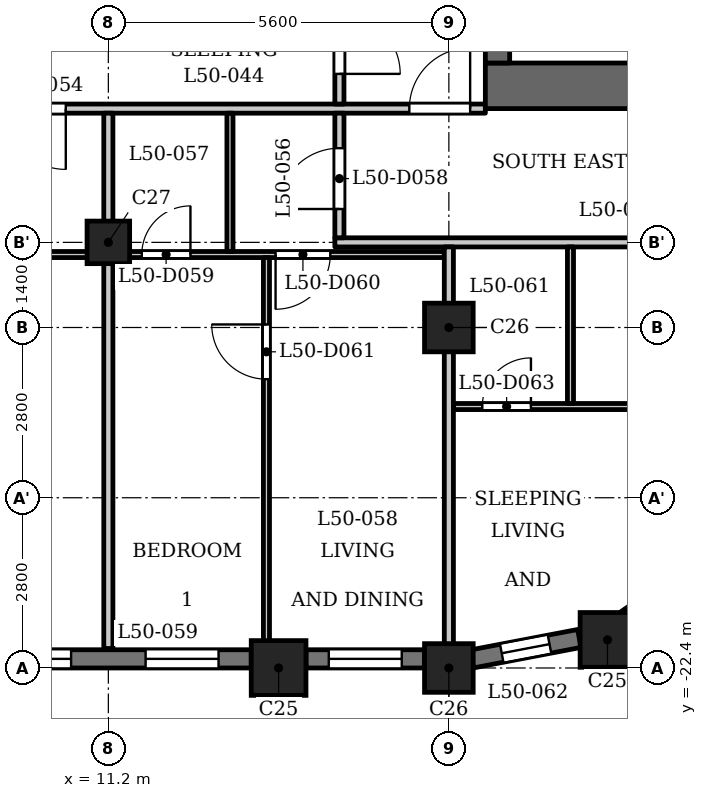
"""IFC4 building model, lengths in metres.
Left out: names, types, materials, properties, quantities, classifications, styles, units other than length and angle.
Written with IfcOpenShell. Run it as: python <this file> out.ifc"""

import sys

from ifc_helpers import new_model, si_unit, direction, frame, frame_2d, origin, origin_2d, place, context, subcontext, project, spatial, rectangle, extrude, element, fill, save


model = new_model("IFC4")
c1 = context("Model", 3, precision=1e-05, world=origin(), true_north=direction((0.0, 1.0)))
c2 = subcontext(c1, "Body", "Model", "MODEL_VIEW")
j1 = project(units=[si_unit("LENGTHUNIT", "METRE"), si_unit("PLANEANGLEUNIT", "RADIAN")], contexts=[c1])
p1 = place(None, origin())
s1 = spatial("IfcSite", under=j1, at=p1, CompositionType="ELEMENT")
p2 = place(p1, origin())
s2 = spatial("IfcBuilding", under=s1, at=p2, CompositionType="ELEMENT")
p3 = place(p2, frame((0.0, 0.0, 195.9)))
s3 = spatial("IfcBuildingStorey", under=s2, at=p3, CompositionType="ELEMENT", Elevation=195.9)
for number, where, z_axis, x_axis in (
    (1, (14.0, -22.4, 0.0), (0.0, 0.0, 1.0), (1.0, 0.0, 0.0)),
    (2, (19.409, -21.938, 0.0), (0.0, 0.0, 1.0), (1.0, 0.0, 0.0)),
):
    element("IfcColumn", number, at=place(p3, frame(where, z_axis=z_axis, x_axis=x_axis)), inside=s3, PredefinedType="COLUMN", context=c2, shape_type="SweptSolid", body=[
        extrude(rectangle(XDim=0.9, YDim=0.9, at=origin_2d()), origin(), (0.0, 0.0, 1.0), 3.5),
    ])
for number, where, z_axis, x_axis in (
    (3, (16.8, -22.4, 0.0), (0.0, 0.0, 1.0), (1.0, 0.0, 0.0)),
    (4, (16.8, -16.8, 0.0), (0.0, 0.0, 1.0), (1.0, 0.0, 0.0)),
):
    element("IfcColumn", number, at=place(p3, frame(where, z_axis=z_axis, x_axis=x_axis)), inside=s3, PredefinedType="COLUMN", context=c2, shape_type="SweptSolid", body=[
        extrude(rectangle(XDim=0.8, YDim=0.8, at=origin_2d()), origin(), (0.0, 0.0, 1.0), 3.5),
    ])
p4 = place(p3, frame((11.2, -15.4, 0.0), z_axis=(0.0, 0.0, 1.0), x_axis=(1.0, 0.0, 0.0)))
e5 = element("IfcColumn", 5, at=p4, inside=s3, PredefinedType="COLUMN", context=c2, shape_type="SweptSolid", body=[
    extrude(rectangle(XDim=0.7, YDim=0.7, at=origin_2d()), origin(), (0.0, 0.0, 1.0), 3.5),
])
p5 = place(p3, frame((8.85, -22.25, 0.0), z_axis=(0.0, 0.0, 1.0), x_axis=(1.0, 0.0, 0.0)))
e6 = element("IfcWall", 6, at=p5, inside=s3, PredefinedType="SOLIDWALL", context=c2, shape_type="SweptSolid", body=[
    extrude(rectangle(XDim=4.7, YDim=0.3, at=frame_2d((2.35, 0.0))), origin(), (0.0, 0.0, 1.0), 2.5),
])
p6 = place(p5, frame((0.538, 0.0, 0.6)))
e7 = element("IfcOpeningElement", 7, at=p6, cuts=e6, PredefinedType="OPENING", context=c2, shape_type="SweptSolid", body=[
    extrude(rectangle(XDim=1.2, YDim=1.55, at=frame_2d((0.6, 0.775))), frame((0.0, 0.16, 0.0), z_axis=(0.0, -1.0, 0.0), x_axis=(1.0, 0.0, 0.0)), (0.0, 0.0, 1.0), 0.32),
])
p7 = place(p5, frame((2.962, 0.0, 0.6)))
e8 = element("IfcOpeningElement", 8, at=p7, cuts=e6, PredefinedType="OPENING", context=c2, shape_type="SweptSolid", body=[
    extrude(rectangle(XDim=1.2, YDim=1.55, at=frame_2d((0.6, 0.775))), frame((0.0, 0.16, 0.0), z_axis=(0.0, -1.0, 0.0), x_axis=(1.0, 0.0, 0.0)), (0.0, 0.0, 1.0), 0.32),
])
p8 = place(p3, frame((14.45, -22.25, 0.0), z_axis=(0.0, 0.0, 1.0), x_axis=(1.0, 0.0, 0.0)))
e9 = element("IfcWall", 9, at=p8, inside=s3, PredefinedType="SOLIDWALL", context=c2, shape_type="SweptSolid", body=[
    extrude(rectangle(XDim=1.95, YDim=0.3, at=frame_2d((0.975, 0.0))), origin(), (0.0, 0.0, 1.0), 2.5),
])
p9 = place(p8, frame((0.375, 0.0, 0.6)))
e10 = element("IfcOpeningElement", 10, at=p9, cuts=e9, PredefinedType="OPENING", context=c2, shape_type="SweptSolid", body=[
    extrude(rectangle(XDim=1.2, YDim=1.55, at=frame_2d((0.6, 0.775))), frame((0.0, 0.16, 0.0), z_axis=(0.0, -1.0, 0.0), x_axis=(1.0, 0.0, 0.0)), (0.0, 0.0, 1.0), 0.32),
])
p10 = place(p3, frame((17.179, -22.251, 0.0), z_axis=(0.0, 0.0, 1.0), x_axis=(0.98230529033, 0.187286722942, 0.0)))
e11 = element("IfcWall", 11, at=p10, inside=s3, PredefinedType="SOLIDWALL", context=c2, shape_type="SweptSolid", body=[
    extrude(rectangle(XDim=1.799, YDim=0.3, at=frame_2d((0.899, 0.0))), origin(), (0.0, 0.0, 1.0), 2.5),
])
p11 = place(p10, frame((0.5, 0.0, 0.6)))
e12 = element("IfcOpeningElement", 12, at=p11, cuts=e11, PredefinedType="OPENING", context=c2, shape_type="SweptSolid", body=[
    extrude(rectangle(XDim=0.8, YDim=1.55, at=frame_2d((0.4, 0.775))), frame((0.0, 0.16, 0.0), z_axis=(0.0, -1.0, 0.0), x_axis=(1.0, 0.0, 0.0)), (0.0, 0.0, 1.0), 0.32),
])
p12 = place(p3, frame((19.719, -21.594, 0.0), z_axis=(0.0, 0.0, 1.0), x_axis=(0.827067282455, 0.562102935673, 0.0)))
e13 = element("IfcWall", 13, at=p12, inside=s3, PredefinedType="SOLIDWALL", context=c2, shape_type="SweptSolid", body=[
    extrude(rectangle(XDim=1.806, YDim=0.3, at=frame_2d((0.903, 0.0))), origin(), (0.0, 0.0, 1.0), 2.5),
])
p13 = place(p12, frame((0.503, 0.0, 0.6)))
e14 = element("IfcOpeningElement", 14, at=p13, cuts=e13, PredefinedType="OPENING", context=c2, shape_type="SweptSolid", body=[
    extrude(rectangle(XDim=0.8, YDim=1.55, at=frame_2d((0.4, 0.775))), frame((0.0, 0.16, 0.0), z_axis=(0.0, -1.0, 0.0), x_axis=(1.0, 0.0, 0.0)), (0.0, 0.0, 1.0), 0.32),
])
p14 = place(p3, frame((17.4, -12.825, 0.0), z_axis=(0.0, 0.0, 1.0), x_axis=(1.0, 0.0, 0.0)))
e15 = element("IfcWall", 15, at=p14, inside=s3, PredefinedType="SHEAR", context=c2, shape_type="SweptSolid", body=[
    extrude(rectangle(XDim=7.6, YDim=0.75, at=frame_2d((3.8, 0.0))), origin(), (0.0, 0.0, 1.0), 3.2),
])
p15 = place(p3, frame((17.6, -12.45, 0.0), z_axis=(0.0, 0.0, 1.0), x_axis=(0.0, 1.0, 0.0)))
e16 = element("IfcWall", 16, at=p15, inside=s3, PredefinedType="SHEAR", context=c2, shape_type="SweptSolid", body=[
    extrude(rectangle(XDim=24.9, YDim=0.4, at=frame_2d((12.45, 0.0))), origin(), (0.0, 0.0, 1.0), 3.2),
])
p16 = place(p15, frame((6.325, 0.0, 0.0)))
e17 = element("IfcOpeningElement", 17, at=p16, cuts=e16, PredefinedType="OPENING", context=c2, shape_type="SweptSolid", body=[
    extrude(rectangle(XDim=0.9, YDim=2.1, at=frame_2d((0.45, 1.05))), frame((0.0, 0.21, 0.0), z_axis=(0.0, -1.0, 0.0), x_axis=(1.0, 0.0, 0.0)), (0.0, 0.0, 1.0), 0.42),
])
p17 = place(p15, frame((9.925, 0.0, 0.0)))
e18 = element("IfcOpeningElement", 18, at=p17, cuts=e16, PredefinedType="OPENING", context=c2, shape_type="SweptSolid", body=[
    extrude(rectangle(XDim=0.9, YDim=2.1, at=frame_2d((0.45, 1.05))), frame((0.0, 0.21, 0.0), z_axis=(0.0, -1.0, 0.0), x_axis=(1.0, 0.0, 0.0)), (0.0, 0.0, 1.0), 0.42),
])
p18 = place(p15, frame((15.6, 0.0, 0.0)))
e19 = element("IfcOpeningElement", 19, at=p18, cuts=e16, PredefinedType="OPENING", context=c2, shape_type="SweptSolid", body=[
    extrude(rectangle(XDim=1.1, YDim=2.1, at=frame_2d((0.55, 1.05))), frame((0.0, 0.21, 0.0), z_axis=(0.0, -1.0, 0.0), x_axis=(1.0, 0.0, 0.0)), (0.0, 0.0, 1.0), 0.42),
])
p19 = place(p15, frame((18.0, 0.0, 0.0)))
e20 = element("IfcOpeningElement", 20, at=p19, cuts=e16, PredefinedType="OPENING", context=c2, shape_type="SweptSolid", body=[
    extrude(rectangle(XDim=1.1, YDim=2.1, at=frame_2d((0.55, 1.05))), frame((0.0, 0.21, 0.0), z_axis=(0.0, -1.0, 0.0), x_axis=(1.0, 0.0, 0.0)), (0.0, 0.0, 1.0), 0.42),
])
p20 = place(p15, frame((23.025, 0.0, 0.0)))
e21 = element("IfcOpeningElement", 21, at=p20, cuts=e16, PredefinedType="OPENING", context=c2, shape_type="SweptSolid", body=[
    extrude(rectangle(XDim=1.1, YDim=2.1, at=frame_2d((0.55, 1.05))), frame((0.0, 0.21, 0.0), z_axis=(0.0, -1.0, 0.0), x_axis=(1.0, 0.0, 0.0)), (0.0, 0.0, 1.0), 0.42),
])
p21 = place(p15, frame((0.775, 0.0, 0.0)))
e22 = element("IfcOpeningElement", 22, at=p21, cuts=e16, PredefinedType="OPENING", context=c2, shape_type="SweptSolid", body=[
    extrude(rectangle(XDim=1.1, YDim=2.1, at=frame_2d((0.55, 1.05))), frame((0.0, 0.21, 0.0), z_axis=(0.0, -1.0, 0.0), x_axis=(1.0, 0.0, 0.0)), (0.0, 0.0, 1.0), 0.42),
])
p22 = place(p15, frame((12.925, 0.0, 0.0)))
e23 = element("IfcOpeningElement", 23, at=p22, cuts=e16, PredefinedType="OPENING", context=c2, shape_type="SweptSolid", body=[
    extrude(rectangle(XDim=1.8, YDim=2.1, at=frame_2d((0.9, 1.05))), frame((0.0, 0.21, 0.0), z_axis=(0.0, -1.0, 0.0), x_axis=(1.0, 0.0, 0.0)), (0.0, 0.0, 1.0), 0.42),
])
p23 = place(p3, frame((16.875, -18.1, 0.0), z_axis=(0.0, 0.0, 1.0), x_axis=(1.0, 0.0, 0.0)))
e24 = element("IfcWall", 24, at=p23, inside=s3, PredefinedType="PARTITIONING", context=c2, shape_type="SweptSolid", body=[
    extrude(rectangle(XDim=6.765, YDim=0.1, at=frame_2d((3.382, 0.0))), origin(), (0.0, 0.0, 1.0), 3.2),
])
p24 = place(p23, frame((0.475, 0.0, 0.0)))
e25 = element("IfcOpeningElement", 25, at=p24, cuts=e24, PredefinedType="OPENING", context=c2, shape_type="SweptSolid", body=[
    extrude(rectangle(XDim=0.8, YDim=2.1, at=frame_2d((0.4, 1.05))), frame((0.0, 0.06, 0.0), z_axis=(0.0, -1.0, 0.0), x_axis=(1.0, 0.0, 0.0)), (0.0, 0.0, 1.0), 0.12),
])
p25 = place(p23, frame((4.575, 0.0, 0.0)))
e26 = element("IfcOpeningElement", 26, at=p25, cuts=e24, PredefinedType="OPENING", context=c2, shape_type="SweptSolid", body=[
    extrude(rectangle(XDim=0.9, YDim=2.1, at=frame_2d((0.45, 1.05))), frame((0.0, 0.06, 0.0), z_axis=(0.0, -1.0, 0.0), x_axis=(1.0, 0.0, 0.0)), (0.0, 0.0, 1.0), 0.12),
])
p26 = place(p3, frame((-16.725, -15.6, 0.0), z_axis=(0.0, 0.0, 1.0), x_axis=(1.0, 0.0, 0.0)))
e27 = element("IfcWall", 27, at=p26, inside=s3, PredefinedType="PARTITIONING", context=c2, shape_type="SweptSolid", body=[
    extrude(rectangle(XDim=33.45, YDim=0.1, at=frame_2d((16.725, 0.0))), origin(), (0.0, 0.0, 1.0), 3.2),
])
p27 = place(p26, frame((4.075, 0.0, 0.0)))
e28 = element("IfcOpeningElement", 28, at=p27, cuts=e27, PredefinedType="OPENING", context=c2, shape_type="SweptSolid", body=[
    extrude(rectangle(XDim=0.8, YDim=2.1, at=frame_2d((0.4, 1.05))), frame((0.0, 0.06, 0.0), z_axis=(0.0, -1.0, 0.0), x_axis=(1.0, 0.0, 0.0)), (0.0, 0.0, 1.0), 0.12),
])
p28 = place(p26, frame((1.825, 0.0, 0.0)))
e29 = element("IfcOpeningElement", 29, at=p28, cuts=e27, PredefinedType="OPENING", context=c2, shape_type="SweptSolid", body=[
    extrude(rectangle(XDim=0.9, YDim=2.1, at=frame_2d((0.45, 1.05))), frame((0.0, 0.06, 0.0), z_axis=(0.0, -1.0, 0.0), x_axis=(1.0, 0.0, 0.0)), (0.0, 0.0, 1.0), 0.12),
])
p29 = place(p26, frame((9.675, 0.0, 0.0)))
e30 = element("IfcOpeningElement", 30, at=p29, cuts=e27, PredefinedType="OPENING", context=c2, shape_type="SweptSolid", body=[
    extrude(rectangle(XDim=0.8, YDim=2.1, at=frame_2d((0.4, 1.05))), frame((0.0, 0.06, 0.0), z_axis=(0.0, -1.0, 0.0), x_axis=(1.0, 0.0, 0.0)), (0.0, 0.0, 1.0), 0.12),
])
p30 = place(p26, frame((14.025, 0.0, 0.0)))
e31 = element("IfcOpeningElement", 31, at=p30, cuts=e27, PredefinedType="OPENING", context=c2, shape_type="SweptSolid", body=[
    extrude(rectangle(XDim=0.9, YDim=2.1, at=frame_2d((0.45, 1.05))), frame((0.0, 0.06, 0.0), z_axis=(0.0, -1.0, 0.0), x_axis=(1.0, 0.0, 0.0)), (0.0, 0.0, 1.0), 0.12),
])
p31 = place(p26, frame((20.875, 0.0, 0.0)))
e32 = element("IfcOpeningElement", 32, at=p31, cuts=e27, PredefinedType="OPENING", context=c2, shape_type="SweptSolid", body=[
    extrude(rectangle(XDim=0.8, YDim=2.1, at=frame_2d((0.4, 1.05))), frame((0.0, 0.06, 0.0), z_axis=(0.0, -1.0, 0.0), x_axis=(1.0, 0.0, 0.0)), (0.0, 0.0, 1.0), 0.12),
])
p32 = place(p26, frame((25.225, 0.0, 0.0)))
e33 = element("IfcOpeningElement", 33, at=p32, cuts=e27, PredefinedType="OPENING", context=c2, shape_type="SweptSolid", body=[
    extrude(rectangle(XDim=0.9, YDim=2.1, at=frame_2d((0.45, 1.05))), frame((0.0, 0.06, 0.0), z_axis=(0.0, -1.0, 0.0), x_axis=(1.0, 0.0, 0.0)), (0.0, 0.0, 1.0), 0.12),
])
p33 = place(p26, frame((28.475, 0.0, 0.0)))
e34 = element("IfcOpeningElement", 34, at=p33, cuts=e27, PredefinedType="OPENING", context=c2, shape_type="SweptSolid", body=[
    extrude(rectangle(XDim=0.8, YDim=2.1, at=frame_2d((0.4, 1.05))), frame((0.0, 0.06, 0.0), z_axis=(0.0, -1.0, 0.0), x_axis=(1.0, 0.0, 0.0)), (0.0, 0.0, 1.0), 0.12),
])
p34 = place(p26, frame((30.675, 0.0, 0.0)))
e35 = element("IfcOpeningElement", 35, at=p34, cuts=e27, PredefinedType="OPENING", context=c2, shape_type="SweptSolid", body=[
    extrude(rectangle(XDim=0.9, YDim=2.1, at=frame_2d((0.45, 1.05))), frame((0.0, 0.06, 0.0), z_axis=(0.0, -1.0, 0.0), x_axis=(1.0, 0.0, 0.0)), (0.0, 0.0, 1.0), 0.12),
])
p35 = place(p3, frame((14.925, -15.4, 0.0), z_axis=(0.0, 0.0, 1.0), x_axis=(1.0, 0.0, 0.0)))
e36 = element("IfcWall", 36, at=p35, inside=s3, PredefinedType="PARTITIONING", context=c2, shape_type="SweptSolid", body=[
    extrude(rectangle(XDim=9.759, YDim=0.15, at=frame_2d((4.879, 0.0))), origin(), (0.0, 0.0, 1.0), 3.2),
])
p36 = place(p35, frame((7.775, 0.0, 0.0)))
e37 = element("IfcOpeningElement", 37, at=p36, cuts=e36, PredefinedType="OPENING", context=c2, shape_type="SweptSolid", body=[
    extrude(rectangle(XDim=1.0, YDim=2.1, at=frame_2d((0.5, 1.05))), frame((0.0, 0.085, 0.0), z_axis=(0.0, -1.0, 0.0), x_axis=(1.0, 0.0, 0.0)), (0.0, 0.0, 1.0), 0.17),
])
p37 = place(p3, frame((-17.4, -13.2, 0.0), z_axis=(0.0, 0.0, 1.0), x_axis=(1.0, 0.0, 0.0)))
e38 = element("IfcWall", 38, at=p37, inside=s3, PredefinedType="PARTITIONING", context=c2, shape_type="SweptSolid", body=[
    extrude(rectangle(XDim=34.8, YDim=0.15, at=frame_2d((17.4, 0.0))), origin(), (0.0, 0.0, 1.0), 3.2),
])
p38 = place(p37, frame((0.15, 0.0, 0.0)))
e39 = element("IfcOpeningElement", 39, at=p38, cuts=e38, PredefinedType="OPENING", context=c2, shape_type="SweptSolid", body=[
    extrude(rectangle(XDim=1.0, YDim=2.1, at=frame_2d((0.5, 1.05))), frame((0.0, 0.085, 0.0), z_axis=(0.0, -1.0, 0.0), x_axis=(1.0, 0.0, 0.0)), (0.0, 0.0, 1.0), 0.17),
])
p39 = place(p37, frame((33.55, 0.0, 0.0)))
e40 = element("IfcOpeningElement", 40, at=p39, cuts=e38, PredefinedType="OPENING", context=c2, shape_type="SweptSolid", body=[
    extrude(rectangle(XDim=1.0, YDim=2.1, at=frame_2d((0.5, 1.05))), frame((0.0, 0.085, 0.0), z_axis=(0.0, -1.0, 0.0), x_axis=(1.0, 0.0, 0.0)), (0.0, 0.0, 1.0), 0.17),
])
p40 = place(p37, frame((15.7, 0.0, 0.0)))
e41 = element("IfcOpeningElement", 41, at=p40, cuts=e38, PredefinedType="OPENING", context=c2, shape_type="SweptSolid", body=[
    extrude(rectangle(XDim=1.0, YDim=2.1, at=frame_2d((0.5, 1.05))), frame((0.0, 0.085, 0.0), z_axis=(0.0, -1.0, 0.0), x_axis=(1.0, 0.0, 0.0)), (0.0, 0.0, 1.0), 0.17),
])
p41 = place(p37, frame((26.9, 0.0, 0.0)))
e42 = element("IfcOpeningElement", 42, at=p41, cuts=e38, PredefinedType="OPENING", context=c2, shape_type="SweptSolid", body=[
    extrude(rectangle(XDim=1.0, YDim=2.1, at=frame_2d((0.5, 1.05))), frame((0.0, 0.085, 0.0), z_axis=(0.0, -1.0, 0.0), x_axis=(1.0, 0.0, 0.0)), (0.0, 0.0, 1.0), 0.17),
])
p42 = place(p3, frame((11.2, -22.08, 0.0), z_axis=(0.0, 0.0, 1.0), x_axis=(0.0, 1.0, 0.0)))
e43 = element("IfcWall", 43, at=p42, inside=s3, PredefinedType="PARTITIONING", context=c2, shape_type="SweptSolid", body=[
    extrude(rectangle(XDim=6.43, YDim=0.15, at=frame_2d((3.215, 0.0))), origin(), (0.0, 0.0, 1.0), 3.2),
])
p43 = place(p3, frame((11.2, -15.55, 0.0), z_axis=(0.0, 0.0, 1.0), x_axis=(0.0, 1.0, 0.0)))
e44 = element("IfcWall", 44, at=p43, inside=s3, PredefinedType="PARTITIONING", context=c2, shape_type="SweptSolid", body=[
    extrude(rectangle(XDim=2.275, YDim=0.15, at=frame_2d((1.138, 0.0))), origin(), (0.0, 0.0, 1.0), 3.2),
])
p44 = place(p3, frame((13.2, -15.55, 0.0), z_axis=(0.0, 0.0, 1.0), x_axis=(0.0, 1.0, 0.0)))
e45 = element("IfcWall", 45, at=p44, inside=s3, PredefinedType="PARTITIONING", context=c2, shape_type="SweptSolid", body=[
    extrude(rectangle(XDim=2.275, YDim=0.1, at=frame_2d((1.138, 0.0))), origin(), (0.0, 0.0, 1.0), 3.2),
])
p45 = place(p3, frame((13.8, -22.83, 0.0), z_axis=(0.0, 0.0, 1.0), x_axis=(0.0, 1.0, 0.0)))
e46 = element("IfcWall", 46, at=p45, inside=s3, PredefinedType="PARTITIONING", context=c2, shape_type="SweptSolid", body=[
    extrude(rectangle(XDim=7.18, YDim=0.1, at=frame_2d((3.59, 0.0))), origin(), (0.0, 0.0, 1.0), 3.2),
])
p46 = place(p45, frame((5.18, 0.0, 0.0)))
e47 = element("IfcOpeningElement", 47, at=p46, cuts=e46, PredefinedType="OPENING", context=c2, shape_type="SweptSolid", body=[
    extrude(rectangle(XDim=0.9, YDim=2.1, at=frame_2d((0.45, 1.05))), frame((0.0, 0.06, 0.0), z_axis=(0.0, -1.0, 0.0), x_axis=(1.0, 0.0, 0.0)), (0.0, 0.0, 1.0), 0.12),
])
p47 = place(p3, frame((15.0, -15.325, 0.0), z_axis=(0.0, 0.0, 1.0), x_axis=(0.0, 1.0, 0.0)))
e48 = element("IfcWall", 48, at=p47, inside=s3, PredefinedType="PARTITIONING", context=c2, shape_type="SweptSolid", body=[
    extrude(rectangle(XDim=2.05, YDim=0.15, at=frame_2d((1.025, 0.0))), origin(), (0.0, 0.0, 1.0), 3.2),
])
p48 = place(p47, frame((0.474, 0.0, 0.0)))
e49 = element("IfcOpeningElement", 49, at=p48, cuts=e48, PredefinedType="OPENING", context=c2, shape_type="SweptSolid", body=[
    extrude(rectangle(XDim=1.0, YDim=2.1, at=frame_2d((0.5, 1.05))), frame((0.0, 0.085, 0.0), z_axis=(0.0, -1.0, 0.0), x_axis=(1.0, 0.0, 0.0)), (0.0, 0.0, 1.0), 0.17),
])
p49 = place(p3, frame((15.0, -13.125, 0.0), z_axis=(0.0, 0.0, 1.0), x_axis=(0.0, 1.0, 0.0)))
e50 = element("IfcWall", 50, at=p49, inside=s3, PredefinedType="PARTITIONING", context=c2, shape_type="SweptSolid", body=[
    extrude(rectangle(XDim=6.356, YDim=0.15, at=frame_2d((3.178, 0.0))), origin(), (0.0, 0.0, 1.0), 3.2),
])
p50 = place(p49, frame((0.496, 0.0, 0.0)))
e51 = element("IfcOpeningElement", 51, at=p50, cuts=e50, PredefinedType="OPENING", context=c2, shape_type="SweptSolid", body=[
    extrude(rectangle(XDim=1.0, YDim=2.1, at=frame_2d((0.5, 1.05))), frame((0.0, 0.085, 0.0), z_axis=(0.0, -1.0, 0.0), x_axis=(1.0, 0.0, 0.0)), (0.0, 0.0, 1.0), 0.17),
])
p51 = place(p3, frame((16.8, -22.31, 0.0), z_axis=(0.0, 0.0, 1.0), x_axis=(0.0, 1.0, 0.0)))
e52 = element("IfcWall", 52, at=p51, inside=s3, PredefinedType="PARTITIONING", context=c2, shape_type="SweptSolid", body=[
    extrude(rectangle(XDim=6.835, YDim=0.15, at=frame_2d((3.417, 0.0))), origin(), (0.0, 0.0, 1.0), 2.55),
])
p52 = place(p3, frame((18.8, -18.05, 0.0), z_axis=(0.0, 0.0, 1.0), x_axis=(0.0, 1.0, 0.0)))
e53 = element("IfcWall", 53, at=p52, inside=s3, PredefinedType="PARTITIONING", context=c2, shape_type="SweptSolid", body=[
    extrude(rectangle(XDim=2.575, YDim=0.1, at=frame_2d((1.288, 0.0))), origin(), (0.0, 0.0, 1.0), 3.2),
])
p53 = place(p50, origin())
e54 = element("IfcDoor", 54, at=p53, inside=s3, OperationType="SINGLE_SWING_LEFT", PredefinedType="DOOR", context=c2, shape_type="SweptSolid", body=[
    extrude(rectangle(XDim=1.0, YDim=2.1, at=frame_2d((0.5, 1.05))), frame((0.0, 0.025, 0.0), z_axis=(0.0, -1.0, 0.0), x_axis=(1.0, 0.0, 0.0)), (0.0, 0.0, 1.0), 0.05),
])
fill(e51, e54)
p54 = place(p39, origin())
e55 = element("IfcDoor", 55, at=p54, inside=s3, OperationType="SINGLE_SWING_LEFT", PredefinedType="DOOR", context=c2, shape_type="SweptSolid", body=[
    extrude(rectangle(XDim=1.0, YDim=2.1, at=frame_2d((0.5, 1.05))), frame((0.0, 0.025, 0.0), z_axis=(0.0, -1.0, 0.0), x_axis=(1.0, 0.0, 0.0)), (0.0, 0.0, 1.0), 0.05),
])
fill(e40, e55)
p55 = place(p41, origin())
e56 = element("IfcDoor", 56, at=p55, inside=s3, OperationType="SINGLE_SWING_RIGHT", PredefinedType="DOOR", context=c2, shape_type="SweptSolid", body=[
    extrude(rectangle(XDim=1.0, YDim=2.1, at=frame_2d((0.5, 1.05))), frame((0.0, 0.025, 0.0), z_axis=(0.0, -1.0, 0.0), x_axis=(1.0, 0.0, 0.0)), (0.0, 0.0, 1.0), 0.05),
])
fill(e42, e56)
p56 = place(p48, origin())
e57 = element("IfcDoor", 57, at=p56, inside=s3, OperationType="SINGLE_SWING_RIGHT", PredefinedType="DOOR", context=c2, shape_type="SweptSolid", body=[
    extrude(rectangle(XDim=1.0, YDim=2.1, at=frame_2d((0.5, 1.05))), frame((0.0, 0.025, 0.0), z_axis=(0.0, -1.0, 0.0), x_axis=(1.0, 0.0, 0.0)), (0.0, 0.0, 1.0), 0.05),
])
fill(e49, e57)
p57 = place(p33, origin())
e58 = element("IfcDoor", 58, at=p57, inside=s3, OperationType="SINGLE_SWING_LEFT", PredefinedType="DOOR", context=c2, shape_type="SweptSolid", body=[
    extrude(rectangle(XDim=0.8, YDim=2.1, at=frame_2d((0.4, 1.05))), frame((0.0, 0.025, 0.0), z_axis=(0.0, -1.0, 0.0), x_axis=(1.0, 0.0, 0.0)), (0.0, 0.0, 1.0), 0.05),
])
fill(e34, e58)
p58 = place(p34, origin())
e59 = element("IfcDoor", 59, at=p58, inside=s3, OperationType="SINGLE_SWING_LEFT", PredefinedType="DOOR", context=c2, shape_type="SweptSolid", body=[
    extrude(rectangle(XDim=0.9, YDim=2.1, at=frame_2d((0.45, 1.05))), frame((0.0, 0.025, 0.0), z_axis=(0.0, -1.0, 0.0), x_axis=(1.0, 0.0, 0.0)), (0.0, 0.0, 1.0), 0.05),
])
fill(e35, e59)
p59 = place(p46, origin())
e60 = element("IfcDoor", 60, at=p59, inside=s3, OperationType="SINGLE_SWING_LEFT", PredefinedType="DOOR", context=c2, shape_type="SweptSolid", body=[
    extrude(rectangle(XDim=0.9, YDim=2.1, at=frame_2d((0.45, 1.05))), frame((0.0, 0.025, 0.0), z_axis=(0.0, -1.0, 0.0), x_axis=(1.0, 0.0, 0.0)), (0.0, 0.0, 1.0), 0.05),
])
fill(e47, e60)
p60 = place(p24, origin())
e61 = element("IfcDoor", 61, at=p60, inside=s3, OperationType="SINGLE_SWING_LEFT", PredefinedType="DOOR", context=c2, shape_type="SweptSolid", body=[
    extrude(rectangle(XDim=0.8, YDim=2.1, at=frame_2d((0.4, 1.05))), frame((0.0, 0.025, 0.0), z_axis=(0.0, -1.0, 0.0), x_axis=(1.0, 0.0, 0.0)), (0.0, 0.0, 1.0), 0.05),
])
fill(e25, e61)
p61 = place(p6, origin())
e62 = element("IfcWindow", 62, at=p61, inside=s3, PartitioningType="SINGLE_PANEL", PredefinedType="WINDOW", context=c2, shape_type="SweptSolid", body=[
    extrude(rectangle(XDim=1.2, YDim=1.55, at=frame_2d((0.6, 0.775))), frame((0.0, 0.03, 0.0), z_axis=(0.0, -1.0, 0.0), x_axis=(1.0, 0.0, 0.0)), (0.0, 0.0, 1.0), 0.06),
])
fill(e7, e62)
p62 = place(p7, origin())
e63 = element("IfcWindow", 63, at=p62, inside=s3, PartitioningType="SINGLE_PANEL", PredefinedType="WINDOW", context=c2, shape_type="SweptSolid", body=[
    extrude(rectangle(XDim=1.2, YDim=1.55, at=frame_2d((0.6, 0.775))), frame((0.0, 0.03, 0.0), z_axis=(0.0, -1.0, 0.0), x_axis=(1.0, 0.0, 0.0)), (0.0, 0.0, 1.0), 0.06),
])
fill(e8, e63)
p63 = place(p9, origin())
e64 = element("IfcWindow", 64, at=p63, inside=s3, PartitioningType="SINGLE_PANEL", PredefinedType="WINDOW", context=c2, shape_type="SweptSolid", body=[
    extrude(rectangle(XDim=1.2, YDim=1.55, at=frame_2d((0.6, 0.775))), frame((0.0, 0.03, 0.0), z_axis=(0.0, -1.0, 0.0), x_axis=(1.0, 0.0, 0.0)), (0.0, 0.0, 1.0), 0.06),
])
fill(e10, e64)
p64 = place(p11, origin())
e65 = element("IfcWindow", 65, at=p64, inside=s3, PartitioningType="SINGLE_PANEL", PredefinedType="WINDOW", context=c2, shape_type="SweptSolid", body=[
    extrude(rectangle(XDim=0.8, YDim=1.55, at=frame_2d((0.4, 0.775))), frame((0.0, 0.03, 0.0), z_axis=(0.0, -1.0, 0.0), x_axis=(1.0, 0.0, 0.0)), (0.0, 0.0, 1.0), 0.06),
])
fill(e12, e65)
save(model, sys.argv[1])
